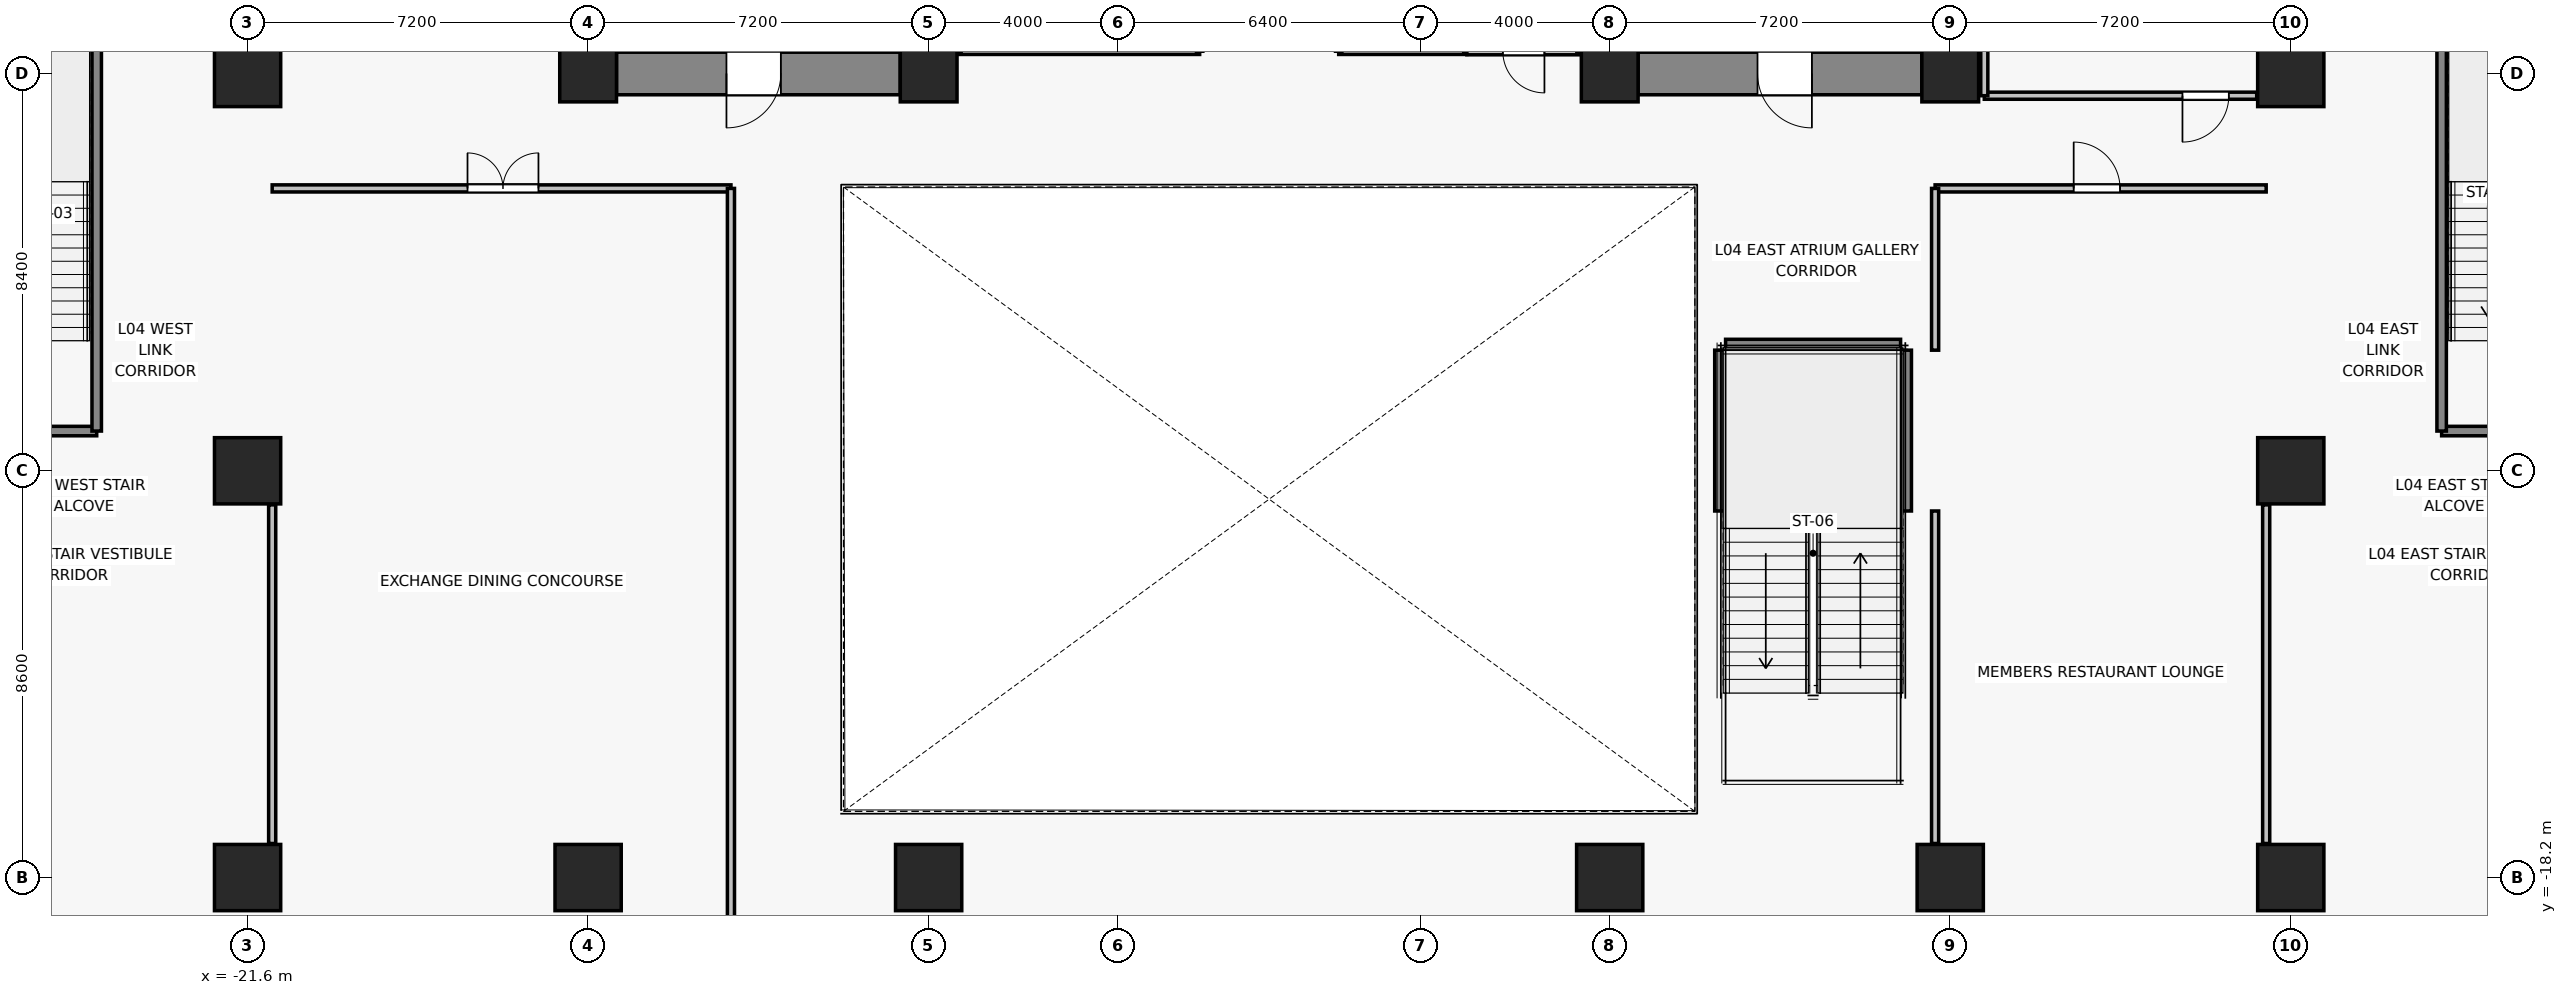
"""IFC4 building model, lengths in metres.
Left out: names, types, materials, properties, quantities, classifications, styles, units other than length and angle.
Written with IfcOpenShell. Run it as: python <this file> out.ifc"""

import sys

from ifc_helpers import new_model, si_unit, direction, frame, frame_2d, origin, origin_2d, place, context, subcontext, project, spatial, rectangle, extrude, source, transform, mapped, element, fill, save


model = new_model("IFC4")
c1 = context("Model", 3, precision=1e-05, world=origin(), true_north=direction((0.0, 1.0)))
c2 = subcontext(c1, "Body", "Model", "MODEL_VIEW")
j1 = project(units=[si_unit("LENGTHUNIT", "METRE"), si_unit("PLANEANGLEUNIT", "RADIAN")], contexts=[c1])
p1 = place(None, origin())
s1 = spatial("IfcSite", under=j1, at=p1, CompositionType="ELEMENT")
p2 = place(p1, origin())
s2 = spatial("IfcBuilding", under=s1, at=p2, CompositionType="ELEMENT")
p3 = place(p2, frame((0.0, 0.0, 18.2)))
s3 = spatial("IfcBuildingStorey", under=s2, at=p3, CompositionType="ELEMENT", Elevation=18.2)
for number, where, z_axis, x_axis in (
    (1, (-14.4, -1.2, 0.0), (0.0, 0.0, 1.0), (1.0, 0.0, 0.0)),
    (2, (-7.2, -1.2, 0.0), (0.0, 0.0, 1.0), (1.0, 0.0, 0.0)),
    (3, (7.2, -1.2, 0.0), (0.0, 0.0, 1.0), (1.0, 0.0, 0.0)),
    (4, (14.4, -1.2, 0.0), (0.0, 0.0, 1.0), (1.0, 0.0, 0.0)),
):
    element("IfcColumn", number, at=place(p3, frame(where, z_axis=z_axis, x_axis=x_axis)), inside=s3, PredefinedType="COLUMN", context=c2, shape_type="SweptSolid", body=[
        extrude(rectangle(XDim=1.2, YDim=1.2, at=origin_2d()), origin(), (0.0, 0.0, 1.0), 4.4),
    ])
for number, where, z_axis, x_axis in (
    (5, (-21.6, -18.2, 0.0), (0.0, 0.0, 1.0), (1.0, 0.0, 0.0)),
    (6, (-14.4, -18.2, 0.0), (0.0, 0.0, 1.0), (1.0, 0.0, 0.0)),
    (7, (-7.2, -18.2, 0.0), (0.0, 0.0, 1.0), (1.0, 0.0, 0.0)),
    (8, (7.2, -18.2, 0.0), (0.0, 0.0, 1.0), (1.0, 0.0, 0.0)),
    (9, (14.4, -18.2, 0.0), (0.0, 0.0, 1.0), (1.0, 0.0, 0.0)),
    (10, (21.6, -18.2, 0.0), (0.0, 0.0, 1.0), (1.0, 0.0, 0.0)),
    (11, (-21.6, -9.6, 0.0), (0.0, 0.0, 1.0), (1.0, 0.0, 0.0)),
    (12, (21.6, -9.6, 0.0), (0.0, 0.0, 1.0), (1.0, 0.0, 0.0)),
    (13, (-21.6, -1.2, 0.0), (0.0, 0.0, 1.0), (1.0, 0.0, 0.0)),
    (14, (21.6, -1.2, 0.0), (0.0, 0.0, 1.0), (1.0, 0.0, 0.0)),
):
    element("IfcColumn", number, at=place(p3, frame(where, z_axis=z_axis, x_axis=x_axis)), inside=s3, PredefinedType="COLUMN", context=c2, shape_type="SweptSolid", body=[
        extrude(rectangle(XDim=1.4, YDim=1.4, at=origin_2d()), origin(), (0.0, 0.0, 1.0), 4.4),
    ])
p4 = place(p3, frame((-7.8, -1.2, 0.0), z_axis=(0.0, 0.0, 1.0), x_axis=(-1.0, 0.0, 0.0)))
e15 = element("IfcWall", 15, at=p4, inside=s3, PredefinedType="SHEAR", context=c2, shape_type="SweptSolid", body=[
    extrude(rectangle(XDim=6.0, YDim=0.9, at=frame_2d((3.0, 0.0))), origin(), (0.0, 0.0, 1.0), 4.1),
])
p5 = place(p4, frame((2.525, 0.0, 0.0)))
e16 = element("IfcOpeningElement", 16, at=p5, cuts=e15, PredefinedType="OPENING", context=c2, shape_type="SweptSolid", body=[
    extrude(rectangle(XDim=1.15, YDim=2.15, at=frame_2d((0.575, 1.075))), frame((0.0, 0.46, 0.0), z_axis=(0.0, -1.0, 0.0), x_axis=(1.0, 0.0, 0.0)), (0.0, 0.0, 1.0), 0.92),
])
p6 = place(p3, frame((13.8, -1.2, 0.0), z_axis=(0.0, 0.0, 1.0), x_axis=(-1.0, 0.0, 0.0)))
e17 = element("IfcWall", 17, at=p6, inside=s3, PredefinedType="SHEAR", context=c2, shape_type="SweptSolid", body=[
    extrude(rectangle(XDim=6.0, YDim=0.9, at=frame_2d((3.0, 0.0))), origin(), (0.0, 0.0, 1.0), 4.1),
])
p7 = place(p6, frame((2.325, 0.0, 0.0)))
e18 = element("IfcOpeningElement", 18, at=p7, cuts=e17, PredefinedType="OPENING", context=c2, shape_type="SweptSolid", body=[
    extrude(rectangle(XDim=1.15, YDim=2.15, at=frame_2d((0.575, 1.075))), frame((0.0, 0.46, 0.0), z_axis=(0.0, -1.0, 0.0), x_axis=(1.0, 0.0, 0.0)), (0.0, 0.0, 1.0), 0.92),
])
for number, where, z_axis, x_axis in (
    (19, (9.52, -10.45, 0.0), (0.0, 0.0, 1.0), (0.0, 1.0, 0.0)),
    (20, (13.48, -7.05, 0.0), (0.0, 0.0, 1.0), (0.0, -1.0, 0.0)),
):
    element("IfcWall", number, at=place(p3, frame(where, z_axis=z_axis, x_axis=x_axis)), inside=s3, PredefinedType="SOLIDWALL", context=c2, shape_type="SweptSolid", body=[
        extrude(rectangle(XDim=3.4, YDim=0.2, at=frame_2d((1.7, 0.0))), origin(), (0.0, 0.0, 1.0), 4.1),
    ])
p8 = place(p3, frame((9.65, -6.92, 0.0), z_axis=(0.0, 0.0, 1.0), x_axis=(1.0, 0.0, 0.0)))
e21 = element("IfcWall", 21, at=p8, inside=s3, PredefinedType="SOLIDWALL", context=c2, shape_type="SweptSolid", body=[
    extrude(rectangle(XDim=3.7, YDim=0.2, at=frame_2d((1.85, 0.0))), origin(), (0.0, 0.0, 1.0), 4.1),
])
p9 = place(p3, frame((-1.47, -0.73, 0.0), z_axis=(0.0, 0.0, 1.0), x_axis=(-1.0, 0.0, 0.0)))
e22 = element("IfcWall", 22, at=p9, inside=s3, PredefinedType="PARTITIONING", context=c2, shape_type="SweptSolid", body=[
    extrude(rectangle(XDim=5.11, YDim=0.135, at=frame_2d((2.555, 0.0))), origin(), (0.0, 0.0, 1.0), 4.1),
])
p10 = place(p3, frame((4.18, -0.73, 0.0), z_axis=(0.0, 0.0, 1.0), x_axis=(-1.0, 0.0, 0.0)))
e23 = element("IfcWall", 23, at=p10, inside=s3, PredefinedType="PARTITIONING", context=c2, shape_type="SweptSolid", body=[
    extrude(rectangle(XDim=2.71, YDim=0.135, at=frame_2d((1.355, 0.0))), origin(), (0.0, 0.0, 1.0), 4.1),
])
p11 = place(p3, frame((6.58, -0.73, 0.0), z_axis=(0.0, 0.0, 1.0), x_axis=(-1.0, 0.0, 0.0)))
e24 = element("IfcWall", 24, at=p11, inside=s3, PredefinedType="PARTITIONING", context=c2, shape_type="SweptSolid", body=[
    extrude(rectangle(XDim=2.4, YDim=0.15, at=frame_2d((1.2, 0.0))), origin(), (0.0, 0.0, 1.0), 4.1),
])
p12 = place(p11, frame((0.76, 0.0, 0.0)))
e25 = element("IfcOpeningElement", 25, at=p12, cuts=e24, PredefinedType="OPENING", context=c2, shape_type="SweptSolid", body=[
    extrude(rectangle(XDim=0.88, YDim=2.1, at=frame_2d((0.44, 1.05))), frame((0.0, 0.085, 0.0), z_axis=(0.0, -1.0, 0.0), x_axis=(1.0, 0.0, 0.0)), (0.0, 0.0, 1.0), 0.17),
])
p13 = place(p3, frame((-24.79, -8.76, 0.0), z_axis=(0.0, 0.0, 1.0), x_axis=(-1.0, 0.0, 0.0)))
e26 = element("IfcWall", 26, at=p13, inside=s3, PredefinedType="SOLIDWALL", context=c2, shape_type="SweptSolid", body=[
    extrude(rectangle(XDim=3.77, YDim=0.2, at=frame_2d((1.885, 0.0))), origin(), (0.0, 0.0, 1.0), 4.1),
])
p14 = place(p13, frame((1.285, 0.0, 0.0)))
e27 = element("IfcOpeningElement", 27, at=p14, cuts=e26, PredefinedType="OPENING", context=c2, shape_type="SweptSolid", body=[
    extrude(rectangle(XDim=1.15, YDim=2.15, at=frame_2d((0.575, 1.075))), frame((0.0, 0.11, 0.0), z_axis=(0.0, -1.0, 0.0), x_axis=(1.0, 0.0, 0.0)), (0.0, 0.0, 1.0), 0.22),
])
p15 = place(p3, frame((-24.79, 0.16, 0.0), z_axis=(0.0, 0.0, 1.0), x_axis=(0.0, -1.0, 0.0)))
e28 = element("IfcWall", 28, at=p15, inside=s3, PredefinedType="SOLIDWALL", context=c2, shape_type="SweptSolid", body=[
    extrude(rectangle(XDim=8.92, YDim=0.2, at=frame_2d((4.46, 0.0))), origin(), (0.0, 0.0, 1.0), 4.1),
])
p16 = place(p3, frame((28.56, -8.76, 0.0), z_axis=(0.0, 0.0, 1.0), x_axis=(-1.0, 0.0, 0.0)))
e29 = element("IfcWall", 29, at=p16, inside=s3, PredefinedType="SOLIDWALL", context=c2, shape_type="SweptSolid", body=[
    extrude(rectangle(XDim=3.77, YDim=0.2, at=frame_2d((1.885, 0.0))), origin(), (0.0, 0.0, 1.0), 4.1),
])
p17 = place(p16, frame((1.335, 0.0, 0.0)))
e30 = element("IfcOpeningElement", 30, at=p17, cuts=e29, PredefinedType="OPENING", context=c2, shape_type="SweptSolid", body=[
    extrude(rectangle(XDim=1.15, YDim=2.15, at=frame_2d((0.575, 1.075))), frame((0.0, 0.11, 0.0), z_axis=(0.0, -1.0, 0.0), x_axis=(1.0, 0.0, 0.0)), (0.0, 0.0, 1.0), 0.22),
])
p18 = place(p3, frame((24.79, -8.76, 0.0), z_axis=(0.0, 0.0, 1.0), x_axis=(0.0, 1.0, 0.0)))
e31 = element("IfcWall", 31, at=p18, inside=s3, PredefinedType="SOLIDWALL", context=c2, shape_type="SweptSolid", body=[
    extrude(rectangle(XDim=8.92, YDim=0.2, at=frame_2d((4.46, 0.0))), origin(), (0.0, 0.0, 1.0), 4.1),
])
p19 = place(p3, frame((-21.08, -3.63, 0.0), z_axis=(0.0, 0.0, 1.0), x_axis=(1.0, 0.0, 0.0)))
e32 = element("IfcWall", 32, at=p19, inside=s3, PredefinedType="PARTITIONING", context=c2, shape_type="SweptSolid", body=[
    extrude(rectangle(XDim=9.7, YDim=0.15, at=frame_2d((4.85, 0.0))), origin(), (0.0, 0.0, 1.0), 3.239),
])
p20 = place(p19, frame((4.13, 0.0, 0.0)))
e33 = element("IfcOpeningElement", 33, at=p20, cuts=e32, PredefinedType="OPENING", context=c2, shape_type="SweptSolid", body=[
    extrude(rectangle(XDim=1.5, YDim=2.2, at=frame_2d((0.75, 1.1))), frame((0.0, 0.085, 0.0), z_axis=(0.0, -1.0, 0.0), x_axis=(1.0, 0.0, 0.0)), (0.0, 0.0, 1.0), 0.17),
])
p21 = place(p3, frame((-21.08, -17.48, 0.0), z_axis=(0.0, 0.0, 1.0), x_axis=(0.0, 1.0, 0.0)))
e34 = element("IfcWall", 34, at=p21, inside=s3, PredefinedType="PARTITIONING", context=c2, shape_type="SweptSolid", body=[
    extrude(rectangle(XDim=7.16, YDim=0.15, at=frame_2d((3.58, 0.0))), origin(), (0.0, 0.0, 1.0), 3.29),
])
p22 = place(p3, frame((-11.38, -3.63, 0.0), z_axis=(0.0, 0.0, 1.0), x_axis=(0.0, -1.0, 0.0)))
e35 = element("IfcWall", 35, at=p22, inside=s3, PredefinedType="PARTITIONING", context=c2, shape_type="SweptSolid", body=[
    extrude(rectangle(XDim=16.65, YDim=0.15, at=frame_2d((8.325, 0.0))), origin(), (0.0, 0.0, 1.0), 3.19),
])
p23 = place(p3, frame((14.08, -3.63, 0.0), z_axis=(0.0, 0.0, 1.0), x_axis=(1.0, 0.0, 0.0)))
e36 = element("IfcWall", 36, at=p23, inside=s3, PredefinedType="PARTITIONING", context=c2, shape_type="SweptSolid", body=[
    extrude(rectangle(XDim=7.0, YDim=0.15, at=frame_2d((3.5, 0.0))), origin(), (0.0, 0.0, 1.0), 3.239),
])
p24 = place(p23, frame((2.93, 0.0, 0.0)))
e37 = element("IfcOpeningElement", 37, at=p24, cuts=e36, PredefinedType="OPENING", context=c2, shape_type="SweptSolid", body=[
    extrude(rectangle(XDim=0.98, YDim=2.15, at=frame_2d((0.49, 1.075))), frame((0.0, 0.085, 0.0), z_axis=(0.0, -1.0, 0.0), x_axis=(1.0, 0.0, 0.0)), (0.0, 0.0, 1.0), 0.17),
])
p25 = place(p3, frame((14.08, -17.48, 0.0), z_axis=(0.0, 0.0, 1.0), x_axis=(0.0, 1.0, 0.0)))
e38 = element("IfcWall", 38, at=p25, inside=s3, PredefinedType="PARTITIONING", context=c2, shape_type="SweptSolid", body=[
    extrude(rectangle(XDim=7.03, YDim=0.15, at=frame_2d((3.515, 0.0))), origin(), (0.0, 0.0, 1.0), 3.29),
])
p26 = place(p3, frame((14.08, -7.05, 0.0), z_axis=(0.0, 0.0, 1.0), x_axis=(0.0, 1.0, 0.0)))
e39 = element("IfcWall", 39, at=p26, inside=s3, PredefinedType="PARTITIONING", context=c2, shape_type="SweptSolid", body=[
    extrude(rectangle(XDim=3.42, YDim=0.15, at=frame_2d((1.71, 0.0))), origin(), (0.0, 0.0, 1.0), 3.29),
])
p27 = place(p3, frame((21.08, -10.32, 0.0), z_axis=(0.0, 0.0, 1.0), x_axis=(0.0, -1.0, 0.0)))
e40 = element("IfcWall", 40, at=p27, inside=s3, PredefinedType="PARTITIONING", context=c2, shape_type="SweptSolid", body=[
    extrude(rectangle(XDim=7.16, YDim=0.15, at=frame_2d((3.58, 0.0))), origin(), (0.0, 0.0, 1.0), 3.29),
])
p28 = place(p3, frame((20.88, -1.67, 0.0), z_axis=(0.0, 0.0, 1.0), x_axis=(-1.0, 0.0, 0.0)))
e41 = element("IfcWall", 41, at=p28, inside=s3, PredefinedType="PARTITIONING", context=c2, shape_type="SweptSolid", body=[
    extrude(rectangle(XDim=5.76, YDim=0.15, at=frame_2d((2.88, 0.0))), origin(), (0.0, 0.0, 1.0), 4.1),
])
p29 = place(p28, frame((0.59, 0.0, 0.0)))
e42 = element("IfcOpeningElement", 42, at=p29, cuts=e41, PredefinedType="OPENING", context=c2, shape_type="SweptSolid", body=[
    extrude(rectangle(XDim=0.98, YDim=2.15, at=frame_2d((0.49, 1.075))), frame((0.0, 0.085, 0.0), z_axis=(0.0, -1.0, 0.0), x_axis=(1.0, 0.0, 0.0)), (0.0, 0.0, 1.0), 0.17),
])
p30 = place(p3, frame((15.12, -1.67, 0.0), z_axis=(0.0, 0.0, 1.0), x_axis=(0.0, 1.0, 0.0)))
e43 = element("IfcWall", 43, at=p30, inside=s3, PredefinedType="PARTITIONING", context=c2, shape_type="SweptSolid", body=[
    extrude(rectangle(XDim=15.15, YDim=0.15, at=frame_2d((7.575, 0.0))), origin(), (0.0, 0.0, 1.0), 3.19),
])
m1 = source(origin(), c2, "Body", "SweptSolid", [
    extrude(rectangle(XDim=1.15, YDim=2.15, at=frame_2d((0.575, 1.075))), frame((0.0, 0.025, 0.0), z_axis=(0.0, -1.0, 0.0), x_axis=(1.0, 0.0, 0.0)), (0.0, 0.0, 1.0), 0.05),
])
p31 = place(p5, origin())
e44 = element("IfcDoor", 44, at=p31, inside=s3, OperationType="SINGLE_SWING_RIGHT", PredefinedType="DOOR", context=c2, shape_type="MappedRepresentation", body=[
    mapped(m1, transform((0.0, 0.0, 0.0), x_axis=(1.0, 0.0, 0.0), y_axis=(0.0, 1.0, 0.0), z_axis=(0.0, 0.0, 1.0), scale=1.0)),
])
fill(e16, e44)
p32 = place(p7, origin())
e45 = element("IfcDoor", 45, at=p32, inside=s3, OperationType="SINGLE_SWING_LEFT", PredefinedType="DOOR", context=c2, shape_type="MappedRepresentation", body=[
    mapped(m1, transform((0.0, 0.0, 0.0), x_axis=(1.0, 0.0, 0.0), y_axis=(0.0, 1.0, 0.0), z_axis=(0.0, 0.0, 1.0), scale=1.0)),
])
fill(e18, e45)
m2 = source(origin(), c2, "Body", "SweptSolid", [
    extrude(rectangle(XDim=0.88, YDim=2.1, at=frame_2d((0.44, 1.05))), frame((0.0, 0.025, 0.0), z_axis=(0.0, -1.0, 0.0), x_axis=(1.0, 0.0, 0.0)), (0.0, 0.0, 1.0), 0.05),
])
p33 = place(p12, origin())
e46 = element("IfcDoor", 46, at=p33, inside=s3, OperationType="SINGLE_SWING_LEFT", PredefinedType="DOOR", context=c2, shape_type="MappedRepresentation", body=[
    mapped(m2, transform((0.0, 0.0, 0.0), x_axis=(1.0, 0.0, 0.0), y_axis=(0.0, 1.0, 0.0), z_axis=(0.0, 0.0, 1.0), scale=1.0)),
])
fill(e25, e46)
m3 = source(origin(), c2, "Body", "SweptSolid", [
    extrude(rectangle(XDim=1.5, YDim=2.2, at=frame_2d((0.75, 1.1))), frame((0.0, 0.025, 0.0), z_axis=(0.0, -1.0, 0.0), x_axis=(1.0, 0.0, 0.0)), (0.0, 0.0, 1.0), 0.05),
])
p34 = place(p20, origin())
e47 = element("IfcDoor", 47, at=p34, inside=s3, OperationType="DOUBLE_DOOR_SINGLE_SWING", PredefinedType="DOOR", context=c2, shape_type="MappedRepresentation", body=[
    mapped(m3, transform((0.0, 0.0, 0.0), x_axis=(1.0, 0.0, 0.0), y_axis=(0.0, 1.0, 0.0), z_axis=(0.0, 0.0, 1.0), scale=1.0)),
])
fill(e33, e47)
m4 = source(origin(), c2, "Body", "SweptSolid", [
    extrude(rectangle(XDim=0.98, YDim=2.15, at=frame_2d((0.49, 1.075))), frame((0.0, 0.025, 0.0), z_axis=(0.0, -1.0, 0.0), x_axis=(1.0, 0.0, 0.0)), (0.0, 0.0, 1.0), 0.05),
])
p35 = place(p24, origin())
e48 = element("IfcDoor", 48, at=p35, inside=s3, OperationType="SINGLE_SWING_LEFT", PredefinedType="DOOR", context=c2, shape_type="MappedRepresentation", body=[
    mapped(m4, transform((0.0, 0.0, 0.0), x_axis=(1.0, 0.0, 0.0), y_axis=(0.0, 1.0, 0.0), z_axis=(0.0, 0.0, 1.0), scale=1.0)),
])
fill(e37, e48)
p36 = place(p29, origin())
e49 = element("IfcDoor", 49, at=p36, inside=s3, OperationType="SINGLE_SWING_RIGHT", PredefinedType="DOOR", context=c2, shape_type="MappedRepresentation", body=[
    mapped(m4, transform((0.0, 0.0, 0.0), x_axis=(1.0, 0.0, 0.0), y_axis=(0.0, 1.0, 0.0), z_axis=(0.0, 0.0, 1.0), scale=1.0)),
])
fill(e42, e49)
save(model, sys.argv[1])
